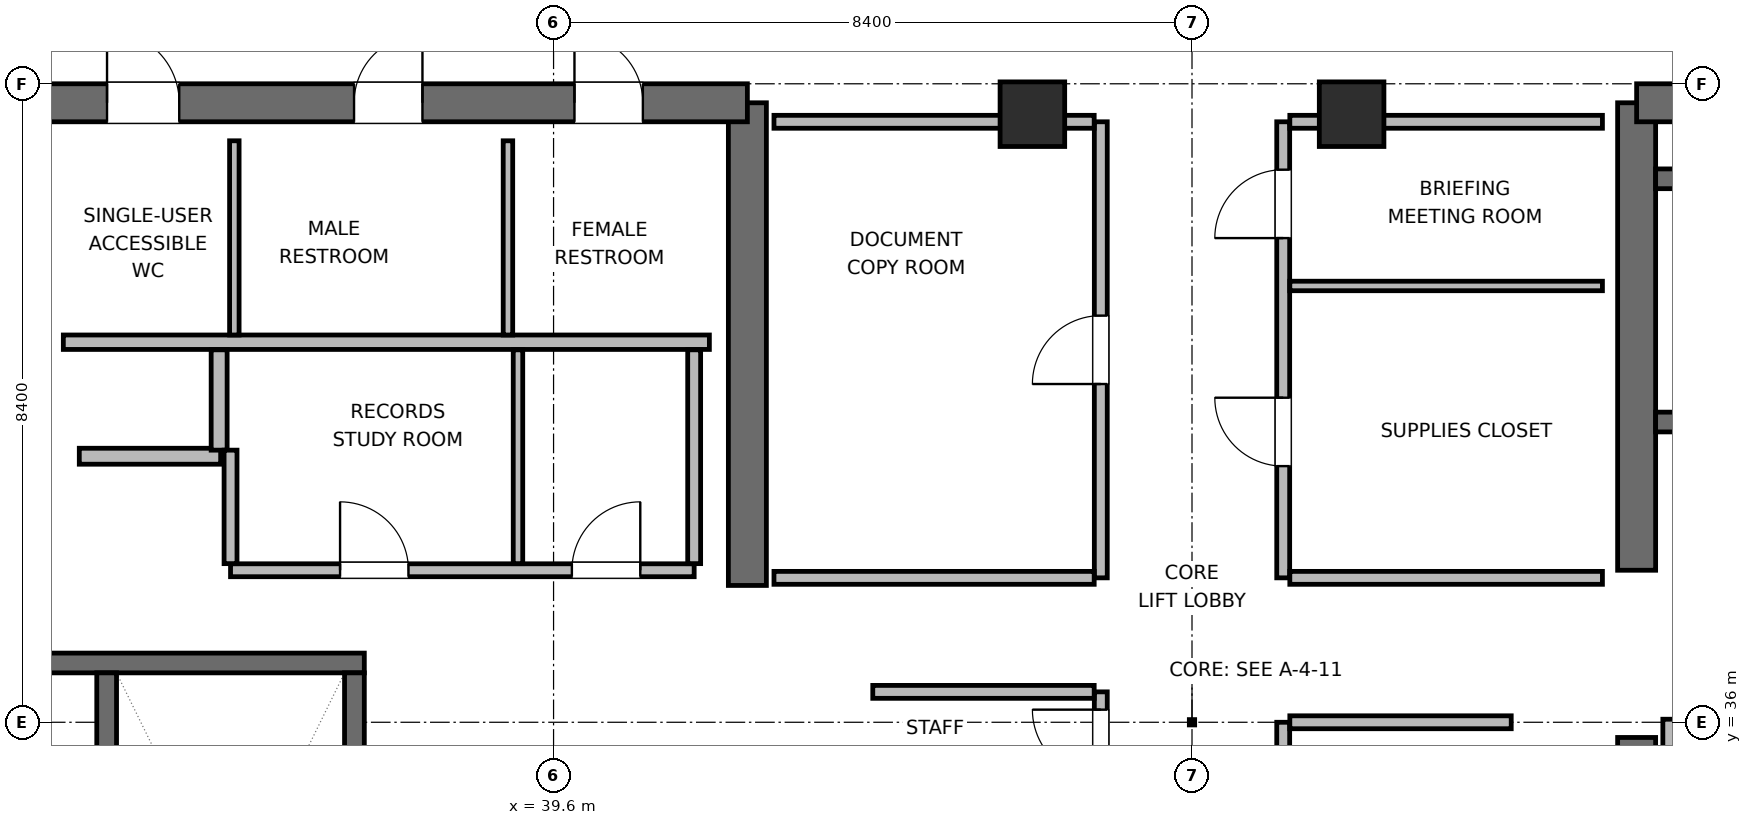
"""IFC4 building model, lengths in metres.
Left out: names, types, materials, properties, quantities, classifications, styles, units other than length and angle.
Written with IfcOpenShell. Run it as: python <this file> out.ifc"""

import sys

from ifc_helpers import new_model, si_unit, direction, frame, frame_2d, origin, origin_2d, place, context, subcontext, project, spatial, rectangle, extrude, element, fill, save


model = new_model("IFC4")
c1 = context("Model", 3, precision=1e-05, world=origin(), true_north=direction((0.0, 1.0)))
c2 = subcontext(c1, "Body", "Model", "MODEL_VIEW")
j1 = project(units=[si_unit("LENGTHUNIT", "METRE"), si_unit("PLANEANGLEUNIT", "RADIAN")], contexts=[c1])
p1 = place(None, origin())
s1 = spatial("IfcSite", under=j1, at=p1, CompositionType="ELEMENT")
p2 = place(p1, origin())
s2 = spatial("IfcBuilding", under=s1, at=p2, CompositionType="ELEMENT")
p3 = place(p2, frame((0.0, 0.0, 286.2)))
s3 = spatial("IfcBuildingStorey", under=s2, at=p3, CompositionType="ELEMENT", Elevation=286.2)
p4 = place(p3, frame((42.15, 37.8, 0.0), z_axis=(0.0, 0.0, 1.0), x_axis=(0.0, 1.0, 0.0)))
e1 = element("IfcWall", 1, at=p4, inside=s3, PredefinedType="SHEAR", context=c2, shape_type="SweptSolid", body=[
    extrude(rectangle(XDim=6.35, YDim=0.5, at=frame_2d((3.175, 0.0))), origin(), (0.0, 0.0, 1.0), 3.9),
])
p5 = place(p3, frame((32.65, 44.15, 0.0), z_axis=(0.0, 0.0, 1.0), x_axis=(1.0, 0.0, 0.0)))
e2 = element("IfcWall", 2, at=p5, inside=s3, PredefinedType="SHEAR", context=c2, shape_type="SweptSolid", body=[
    extrude(rectangle(XDim=9.5, YDim=0.5, at=frame_2d((4.75, 0.0))), origin(), (0.0, 0.0, 1.0), 3.9),
])
p6 = place(p5, frame((1.075, 0.0, 0.0)))
e3 = element("IfcOpeningElement", 3, at=p6, cuts=e2, PredefinedType="OPENING", context=c2, shape_type="SweptSolid", body=[
    extrude(rectangle(XDim=0.95, YDim=2.04, at=frame_2d((0.475, 1.02))), frame((0.0, 0.26, 0.0), z_axis=(0.0, -1.0, 0.0), x_axis=(1.0, 0.0, 0.0)), (0.0, 0.0, 1.0), 0.52),
])
p7 = place(p5, frame((4.325, 0.0, 0.0)))
e4 = element("IfcOpeningElement", 4, at=p7, cuts=e2, PredefinedType="OPENING", context=c2, shape_type="SweptSolid", body=[
    extrude(rectangle(XDim=0.9, YDim=2.02, at=frame_2d((0.45, 1.01))), frame((0.0, 0.26, 0.0), z_axis=(0.0, -1.0, 0.0), x_axis=(1.0, 0.0, 0.0)), (0.0, 0.0, 1.0), 0.52),
])
p8 = place(p5, frame((7.225, 0.0, 0.0)))
e5 = element("IfcOpeningElement", 5, at=p8, cuts=e2, PredefinedType="OPENING", context=c2, shape_type="SweptSolid", body=[
    extrude(rectangle(XDim=0.9, YDim=2.02, at=frame_2d((0.45, 1.01))), frame((0.0, 0.26, 0.0), z_axis=(0.0, -1.0, 0.0), x_axis=(1.0, 0.0, 0.0)), (0.0, 0.0, 1.0), 0.52),
])
p9 = place(p3, frame((53.85, 27.85, 0.0), z_axis=(0.0, 0.0, 1.0), x_axis=(0.0, 1.0, 0.0)))
e6 = element("IfcWall", 6, at=p9, inside=s3, PredefinedType="SHEAR", context=c2, shape_type="SweptSolid", body=[
    extrude(rectangle(XDim=7.95, YDim=0.5, at=frame_2d((3.975, 0.0))), origin(), (0.0, 0.0, 1.0), 3.9),
])
p10 = place(p3, frame((53.85, 38.0, 0.0), z_axis=(0.0, 0.0, 1.0), x_axis=(0.0, 1.0, 0.0)))
e7 = element("IfcWall", 7, at=p10, inside=s3, PredefinedType="SHEAR", context=c2, shape_type="SweptSolid", body=[
    extrude(rectangle(XDim=6.15, YDim=0.5, at=frame_2d((3.075, 0.0))), origin(), (0.0, 0.0, 1.0), 3.9),
])
p11 = place(p3, frame((53.85, 44.15, 0.0), z_axis=(0.0, 0.0, 1.0), x_axis=(1.0, 0.0, 0.0)))
e8 = element("IfcWall", 8, at=p11, inside=s3, PredefinedType="SHEAR", context=c2, shape_type="SweptSolid", body=[
    extrude(rectangle(XDim=9.5, YDim=0.5, at=frame_2d((4.75, 0.0))), origin(), (0.0, 0.0, 1.0), 3.9),
])
p12 = place(p3, frame((32.9, 36.78, 0.0), z_axis=(0.0, 0.0, 1.0), x_axis=(1.0, 0.0, 0.0)))
e9 = element("IfcWall", 9, at=p12, inside=s3, PredefinedType="SHEAR", context=c2, shape_type="SweptSolid", body=[
    extrude(rectangle(XDim=4.21, YDim=0.26, at=frame_2d((2.105, 0.0))), origin(), (0.0, 0.0, 1.0), 3.9),
])
p13 = place(p3, frame((33.72, 29.05, 0.0), z_axis=(0.0, 0.0, 1.0), x_axis=(0.0, 1.0, 0.0)))
e10 = element("IfcWall", 10, at=p13, inside=s3, PredefinedType="SHEAR", context=c2, shape_type="SweptSolid", body=[
    extrude(rectangle(XDim=7.6, YDim=0.26, at=frame_2d((3.8, 0.0))), origin(), (0.0, 0.0, 1.0), 3.9),
])
p14 = place(p3, frame((36.98, 29.05, 0.0), z_axis=(0.0, 0.0, 1.0), x_axis=(0.0, 1.0, 0.0)))
e11 = element("IfcWall", 11, at=p14, inside=s3, PredefinedType="SHEAR", context=c2, shape_type="SweptSolid", body=[
    extrude(rectangle(XDim=7.6, YDim=0.26, at=frame_2d((3.8, 0.0))), origin(), (0.0, 0.0, 1.0), 3.9),
])
p15 = place(p14, frame((0.3, 0.0, 0.0)))
e12 = element("IfcOpeningElement", 12, at=p15, cuts=e11, PredefinedType="OPENING", context=c2, shape_type="SweptSolid", body=[
    extrude(rectangle(XDim=1.0, YDim=2.04, at=frame_2d((0.5, 1.02))), frame((0.0, 0.14, 0.0), z_axis=(0.0, -1.0, 0.0), x_axis=(1.0, 0.0, 0.0)), (0.0, 0.0, 1.0), 0.28),
])
p16 = place(p3, frame((54.1, 39.95, 0.0), z_axis=(0.0, 0.0, 1.0), x_axis=(1.0, 0.0, 0.0)))
e13 = element("IfcWall", 13, at=p16, inside=s3, PredefinedType="SHEAR", context=c2, shape_type="SweptSolid", body=[
    extrude(rectangle(XDim=9.0, YDim=0.26, at=frame_2d((4.5, 0.0))), origin(), (0.0, 0.0, 1.0), 3.9),
])
p17 = place(p16, frame((1.1, 0.0, 0.0)))
e14 = element("IfcOpeningElement", 14, at=p17, cuts=e13, PredefinedType="OPENING", context=c2, shape_type="SweptSolid", body=[
    extrude(rectangle(XDim=1.0, YDim=2.04, at=frame_2d((0.5, 1.02))), frame((0.0, 0.14, 0.0), z_axis=(0.0, -1.0, 0.0), x_axis=(1.0, 0.0, 0.0)), (0.0, 0.0, 1.0), 0.28),
])
p18 = place(p3, frame((54.1, 43.15, 0.0), z_axis=(0.0, 0.0, 1.0), x_axis=(1.0, 0.0, 0.0)))
e15 = element("IfcWall", 15, at=p18, inside=s3, PredefinedType="SHEAR", context=c2, shape_type="SweptSolid", body=[
    extrude(rectangle(XDim=9.0, YDim=0.26, at=frame_2d((4.5, 0.0))), origin(), (0.0, 0.0, 1.0), 3.9),
])
for number, where, z_axis, x_axis in (
    (16, (45.9, 44.0, 0.0), (0.0, 0.0, 1.0), (1.0, 0.0, 0.0)),
    (17, (50.1, 44.0, 0.0), (0.0, 0.0, 1.0), (1.0, 0.0, 0.0)),
):
    element("IfcColumn", number, at=place(p3, frame(where, z_axis=z_axis, x_axis=x_axis)), inside=s3, PredefinedType="COLUMN", context=c2, shape_type="SweptSolid", body=[
        extrude(rectangle(XDim=0.85, YDim=0.85, at=origin_2d()), origin(), (0.0, 0.0, 1.0), 3.9),
    ])
p19 = place(p3, frame((33.15, 41.0, 0.0), z_axis=(0.0, 0.0, 1.0), x_axis=(1.0, 0.0, 0.0)))
e18 = element("IfcWall", 18, at=p19, inside=s3, PredefinedType="PLUMBINGWALL", context=c2, shape_type="SweptSolid", body=[
    extrude(rectangle(XDim=8.5, YDim=0.19, at=frame_2d((4.25, 0.0))), origin(), (0.0, 0.0, 1.0), 3.68),
])
for number, where, z_axis, x_axis in (
    (19, (35.4, 41.095, 0.0), (0.0, 0.0, 1.0), (0.0, 1.0, 0.0)),
    (20, (39.0, 41.095, 0.0), (0.0, 0.0, 1.0), (0.0, 1.0, 0.0)),
):
    element("IfcWall", number, at=place(p3, frame(where, z_axis=z_axis, x_axis=x_axis)), inside=s3, PredefinedType="PARTITIONING", context=c2, shape_type="SweptSolid", body=[
        extrude(rectangle(XDim=2.555, YDim=0.125, at=frame_2d((1.277, 0.0))), origin(), (0.0, 0.0, 1.0), 3.68),
    ])
p20 = place(p3, frame((33.36, 39.5, 0.0), z_axis=(0.0, 0.0, 1.0), x_axis=(1.0, 0.0, 0.0)))
e21 = element("IfcWall", 21, at=p20, inside=s3, PredefinedType="PARTITIONING", context=c2, shape_type="SweptSolid", body=[
    extrude(rectangle(XDim=1.86, YDim=0.21, at=frame_2d((0.93, 0.0))), origin(), (0.0, 0.0, 1.0), 3.68),
])
p21 = place(p3, frame((35.2, 39.58, 0.0), z_axis=(0.0, 0.0, 1.0), x_axis=(0.0, 1.0, 0.0)))
e22 = element("IfcWall", 22, at=p21, inside=s3, PredefinedType="PARTITIONING", context=c2, shape_type="SweptSolid", body=[
    extrude(rectangle(XDim=1.32, YDim=0.21, at=frame_2d((0.66, 0.0))), origin(), (0.0, 0.0, 1.0), 3.68),
])
p22 = place(p3, frame((54.3, 34.26, 0.0), z_axis=(0.0, 0.0, 1.0), x_axis=(0.0, 1.0, 0.0)))
e23 = element("IfcWall", 23, at=p22, inside=s3, PredefinedType="PARTITIONING", context=c2, shape_type="SweptSolid", body=[
    extrude(rectangle(XDim=1.78, YDim=0.21, at=frame_2d((0.89, 0.0))), origin(), (0.0, 0.0, 1.0), 3.68),
])
p23 = place(p3, frame((35.35, 38.0, 0.0), z_axis=(0.0, 0.0, 1.0), x_axis=(1.0, 0.0, 0.0)))
e24 = element("IfcWall", 24, at=p23, inside=s3, PredefinedType="PARTITIONING", context=c2, shape_type="SweptSolid", body=[
    extrude(rectangle(XDim=6.1, YDim=0.17, at=frame_2d((3.05, 0.0))), origin(), (0.0, 0.0, 1.0), 3.68),
])
p24 = place(p23, frame((1.441, 0.0, 0.0)))
e25 = element("IfcOpeningElement", 25, at=p24, cuts=e24, PredefinedType="OPENING", context=c2, shape_type="SweptSolid", body=[
    extrude(rectangle(XDim=0.9, YDim=2.02, at=frame_2d((0.45, 1.01))), frame((0.0, 0.095, 0.0), z_axis=(0.0, -1.0, 0.0), x_axis=(1.0, 0.0, 0.0)), (0.0, 0.0, 1.0), 0.19),
])
p25 = place(p23, frame((4.491, 0.0, 0.0)))
e26 = element("IfcOpeningElement", 26, at=p25, cuts=e24, PredefinedType="OPENING", context=c2, shape_type="SweptSolid", body=[
    extrude(rectangle(XDim=0.9, YDim=2.02, at=frame_2d((0.45, 1.01))), frame((0.0, 0.095, 0.0), z_axis=(0.0, -1.0, 0.0), x_axis=(1.0, 0.0, 0.0)), (0.0, 0.0, 1.0), 0.19),
])
p26 = place(p3, frame((35.35, 38.087, 0.0), z_axis=(0.0, 0.0, 1.0), x_axis=(0.0, 1.0, 0.0)))
e27 = element("IfcWall", 27, at=p26, inside=s3, PredefinedType="PARTITIONING", context=c2, shape_type="SweptSolid", body=[
    extrude(rectangle(XDim=1.493, YDim=0.17, at=frame_2d((0.747, 0.0))), origin(), (0.0, 0.0, 1.0), 3.68),
])
p27 = place(p3, frame((41.45, 38.087, 0.0), z_axis=(0.0, 0.0, 1.0), x_axis=(0.0, 1.0, 0.0)))
e28 = element("IfcWall", 28, at=p27, inside=s3, PredefinedType="PARTITIONING", context=c2, shape_type="SweptSolid", body=[
    extrude(rectangle(XDim=2.813, YDim=0.17, at=frame_2d((1.406, 0.0))), origin(), (0.0, 0.0, 1.0), 3.68),
])
p28 = place(p3, frame((39.132, 38.087, 0.0), z_axis=(0.0, 0.0, 1.0), x_axis=(0.0, 1.0, 0.0)))
e29 = element("IfcWall", 29, at=p28, inside=s3, PredefinedType="PARTITIONING", context=c2, shape_type="SweptSolid", body=[
    extrude(rectangle(XDim=2.813, YDim=0.125, at=frame_2d((1.406, 0.0))), origin(), (0.0, 0.0, 1.0), 3.68),
])
p29 = place(p3, frame((46.8, 32.6, 0.0), z_axis=(0.0, 0.0, 1.0), x_axis=(0.0, 1.0, 0.0)))
e30 = element("IfcWall", 30, at=p29, inside=s3, PredefinedType="PARTITIONING", context=c2, shape_type="SweptSolid", body=[
    extrude(rectangle(XDim=3.8, YDim=0.17, at=frame_2d((1.9, 0.0))), origin(), (0.0, 0.0, 1.0), 3.68),
])
p30 = place(p29, frame((0.766, 0.0, 0.0)))
e31 = element("IfcOpeningElement", 31, at=p30, cuts=e30, PredefinedType="OPENING", context=c2, shape_type="SweptSolid", body=[
    extrude(rectangle(XDim=0.9, YDim=2.02, at=frame_2d((0.45, 1.01))), frame((0.0, 0.095, 0.0), z_axis=(0.0, -1.0, 0.0), x_axis=(1.0, 0.0, 0.0)), (0.0, 0.0, 1.0), 0.19),
])
p31 = place(p29, frame((2.666, 0.0, 0.0)))
e32 = element("IfcOpeningElement", 32, at=p31, cuts=e30, PredefinedType="OPENING", context=c2, shape_type="SweptSolid", body=[
    extrude(rectangle(XDim=0.9, YDim=2.02, at=frame_2d((0.45, 1.01))), frame((0.0, 0.095, 0.0), z_axis=(0.0, -1.0, 0.0), x_axis=(1.0, 0.0, 0.0)), (0.0, 0.0, 1.0), 0.19),
])
p32 = place(p3, frame((43.8, 36.4, 0.0), z_axis=(0.0, 0.0, 1.0), x_axis=(1.0, 0.0, 0.0)))
e33 = element("IfcWall", 33, at=p32, inside=s3, PredefinedType="PARTITIONING", context=c2, shape_type="SweptSolid", body=[
    extrude(rectangle(XDim=2.913, YDim=0.17, at=frame_2d((1.457, 0.0))), origin(), (0.0, 0.0, 1.0), 3.68),
])
p33 = place(p3, frame((49.2, 32.6, 0.0), z_axis=(0.0, 0.0, 1.0), x_axis=(0.0, 1.0, 0.0)))
e34 = element("IfcWall", 34, at=p33, inside=s3, PredefinedType="PARTITIONING", context=c2, shape_type="SweptSolid", body=[
    extrude(rectangle(XDim=3.4, YDim=0.17, at=frame_2d((1.7, 0.0))), origin(), (0.0, 0.0, 1.0), 3.68),
])
p34 = place(p33, frame((0.4, 0.0, 0.0)))
e35 = element("IfcOpeningElement", 35, at=p34, cuts=e34, PredefinedType="OPENING", context=c2, shape_type="SweptSolid", body=[
    extrude(rectangle(XDim=0.9, YDim=2.02, at=frame_2d((0.45, 1.01))), frame((0.0, 0.095, 0.0), z_axis=(0.0, -1.0, 0.0), x_axis=(1.0, 0.0, 0.0)), (0.0, 0.0, 1.0), 0.19),
])
p35 = place(p33, frame((2.1, 0.0, 0.0)))
e36 = element("IfcOpeningElement", 36, at=p35, cuts=e34, PredefinedType="OPENING", context=c2, shape_type="SweptSolid", body=[
    extrude(rectangle(XDim=0.9, YDim=2.02, at=frame_2d((0.45, 1.01))), frame((0.0, 0.095, 0.0), z_axis=(0.0, -1.0, 0.0), x_axis=(1.0, 0.0, 0.0)), (0.0, 0.0, 1.0), 0.19),
])
p36 = place(p3, frame((49.287, 36.0, 0.0), z_axis=(0.0, 0.0, 1.0), x_axis=(1.0, 0.0, 0.0)))
e37 = element("IfcWall", 37, at=p36, inside=s3, PredefinedType="PARTITIONING", context=c2, shape_type="SweptSolid", body=[
    extrude(rectangle(XDim=2.913, YDim=0.17, at=frame_2d((1.457, 0.0))), origin(), (0.0, 0.0, 1.0), 3.68),
])
p37 = place(p3, frame((46.8, 37.9, 0.0), z_axis=(0.0, 0.0, 1.0), x_axis=(0.0, 1.0, 0.0)))
e38 = element("IfcWall", 38, at=p37, inside=s3, PredefinedType="PARTITIONING", context=c2, shape_type="SweptSolid", body=[
    extrude(rectangle(XDim=6.0, YDim=0.17, at=frame_2d((3.0, 0.0))), origin(), (0.0, 0.0, 1.0), 3.68),
])
p38 = place(p37, frame((2.55, 0.0, 0.0)))
e39 = element("IfcOpeningElement", 39, at=p38, cuts=e38, PredefinedType="OPENING", context=c2, shape_type="SweptSolid", body=[
    extrude(rectangle(XDim=0.9, YDim=2.02, at=frame_2d((0.45, 1.01))), frame((0.0, 0.095, 0.0), z_axis=(0.0, -1.0, 0.0), x_axis=(1.0, 0.0, 0.0)), (0.0, 0.0, 1.0), 0.19),
])
p39 = place(p3, frame((42.5, 37.9, 0.0), z_axis=(0.0, 0.0, 1.0), x_axis=(1.0, 0.0, 0.0)))
e40 = element("IfcWall", 40, at=p39, inside=s3, PredefinedType="PARTITIONING", context=c2, shape_type="SweptSolid", body=[
    extrude(rectangle(XDim=4.213, YDim=0.17, at=frame_2d((2.106, 0.0))), origin(), (0.0, 0.0, 1.0), 3.68),
])
p40 = place(p3, frame((42.5, 43.9, 0.0), z_axis=(0.0, 0.0, 1.0), x_axis=(1.0, 0.0, 0.0)))
e41 = element("IfcWall", 41, at=p40, inside=s3, PredefinedType="PARTITIONING", context=c2, shape_type="SweptSolid", body=[
    extrude(rectangle(XDim=4.213, YDim=0.17, at=frame_2d((2.106, 0.0))), origin(), (0.0, 0.0, 1.0), 2.765),
])
p41 = place(p3, frame((49.2, 37.9, 0.0), z_axis=(0.0, 0.0, 1.0), x_axis=(0.0, 1.0, 0.0)))
e42 = element("IfcWall", 42, at=p41, inside=s3, PredefinedType="PARTITIONING", context=c2, shape_type="SweptSolid", body=[
    extrude(rectangle(XDim=6.0, YDim=0.17, at=frame_2d((3.0, 0.0))), origin(), (0.0, 0.0, 1.0), 3.68),
])
p42 = place(p41, frame((1.47, 0.0, 0.0)))
e43 = element("IfcOpeningElement", 43, at=p42, cuts=e42, PredefinedType="OPENING", context=c2, shape_type="SweptSolid", body=[
    extrude(rectangle(XDim=0.9, YDim=2.02, at=frame_2d((0.45, 1.01))), frame((0.0, 0.095, 0.0), z_axis=(0.0, -1.0, 0.0), x_axis=(1.0, 0.0, 0.0)), (0.0, 0.0, 1.0), 0.19),
])
p43 = place(p41, frame((4.47, 0.0, 0.0)))
e44 = element("IfcOpeningElement", 44, at=p43, cuts=e42, PredefinedType="OPENING", context=c2, shape_type="SweptSolid", body=[
    extrude(rectangle(XDim=0.9, YDim=2.02, at=frame_2d((0.45, 1.01))), frame((0.0, 0.095, 0.0), z_axis=(0.0, -1.0, 0.0), x_axis=(1.0, 0.0, 0.0)), (0.0, 0.0, 1.0), 0.19),
])
p44 = place(p3, frame((49.287, 37.9, 0.0), z_axis=(0.0, 0.0, 1.0), x_axis=(1.0, 0.0, 0.0)))
e45 = element("IfcWall", 45, at=p44, inside=s3, PredefinedType="PARTITIONING", context=c2, shape_type="SweptSolid", body=[
    extrude(rectangle(XDim=4.113, YDim=0.17, at=frame_2d((2.056, 0.0))), origin(), (0.0, 0.0, 1.0), 3.68),
])
p45 = place(p3, frame((49.287, 43.9, 0.0), z_axis=(0.0, 0.0, 1.0), x_axis=(1.0, 0.0, 0.0)))
e46 = element("IfcWall", 46, at=p45, inside=s3, PredefinedType="PARTITIONING", context=c2, shape_type="SweptSolid", body=[
    extrude(rectangle(XDim=4.113, YDim=0.17, at=frame_2d((2.056, 0.0))), origin(), (0.0, 0.0, 1.0), 2.765),
])
p46 = place(p3, frame((49.287, 41.74, 0.0), z_axis=(0.0, 0.0, 1.0), x_axis=(1.0, 0.0, 0.0)))
e47 = element("IfcWall", 47, at=p46, inside=s3, PredefinedType="PARTITIONING", context=c2, shape_type="SweptSolid", body=[
    extrude(rectangle(XDim=4.113, YDim=0.125, at=frame_2d((2.056, 0.0))), origin(), (0.0, 0.0, 1.0), 3.68),
])
p47 = place(p6, origin())
e48 = element("IfcDoor", 48, at=p47, inside=s3, OperationType="SINGLE_SWING_LEFT", PredefinedType="DOOR", context=c2, shape_type="SweptSolid", body=[
    extrude(rectangle(XDim=0.95, YDim=2.04, at=frame_2d((0.475, 1.02))), frame((0.0, 0.025, 0.0), z_axis=(0.0, -1.0, 0.0), x_axis=(1.0, 0.0, 0.0)), (0.0, 0.0, 1.0), 0.05),
])
fill(e3, e48)
p48 = place(p7, origin())
e49 = element("IfcDoor", 49, at=p48, inside=s3, OperationType="SINGLE_SWING_RIGHT", PredefinedType="DOOR", context=c2, shape_type="SweptSolid", body=[
    extrude(rectangle(XDim=0.9, YDim=2.02, at=frame_2d((0.45, 1.01))), frame((0.0, 0.025, 0.0), z_axis=(0.0, -1.0, 0.0), x_axis=(1.0, 0.0, 0.0)), (0.0, 0.0, 1.0), 0.05),
])
fill(e4, e49)
p49 = place(p8, origin())
e50 = element("IfcDoor", 50, at=p49, inside=s3, OperationType="SINGLE_SWING_LEFT", PredefinedType="DOOR", context=c2, shape_type="SweptSolid", body=[
    extrude(rectangle(XDim=0.9, YDim=2.02, at=frame_2d((0.45, 1.01))), frame((0.0, 0.025, 0.0), z_axis=(0.0, -1.0, 0.0), x_axis=(1.0, 0.0, 0.0)), (0.0, 0.0, 1.0), 0.05),
])
fill(e5, e50)
p50 = place(p24, origin())
e51 = element("IfcDoor", 51, at=p50, inside=s3, OperationType="SINGLE_SWING_LEFT", PredefinedType="DOOR", context=c2, shape_type="SweptSolid", body=[
    extrude(rectangle(XDim=0.9, YDim=2.02, at=frame_2d((0.45, 1.01))), frame((0.0, 0.025, 0.0), z_axis=(0.0, -1.0, 0.0), x_axis=(1.0, 0.0, 0.0)), (0.0, 0.0, 1.0), 0.05),
])
fill(e25, e51)
p51 = place(p25, origin())
e52 = element("IfcDoor", 52, at=p51, inside=s3, OperationType="SINGLE_SWING_RIGHT", PredefinedType="DOOR", context=c2, shape_type="SweptSolid", body=[
    extrude(rectangle(XDim=0.9, YDim=2.02, at=frame_2d((0.45, 1.01))), frame((0.0, 0.025, 0.0), z_axis=(0.0, -1.0, 0.0), x_axis=(1.0, 0.0, 0.0)), (0.0, 0.0, 1.0), 0.05),
])
fill(e26, e52)
p52 = place(p31, origin())
e53 = element("IfcDoor", 53, at=p52, inside=s3, OperationType="SINGLE_SWING_RIGHT", PredefinedType="DOOR", context=c2, shape_type="SweptSolid", body=[
    extrude(rectangle(XDim=0.9, YDim=2.02, at=frame_2d((0.45, 1.01))), frame((0.0, 0.025, 0.0), z_axis=(0.0, -1.0, 0.0), x_axis=(1.0, 0.0, 0.0)), (0.0, 0.0, 1.0), 0.05),
])
fill(e32, e53)
p53 = place(p38, origin())
e54 = element("IfcDoor", 54, at=p53, inside=s3, OperationType="SINGLE_SWING_LEFT", PredefinedType="DOOR", context=c2, shape_type="SweptSolid", body=[
    extrude(rectangle(XDim=0.9, YDim=2.02, at=frame_2d((0.45, 1.01))), frame((0.0, 0.025, 0.0), z_axis=(0.0, -1.0, 0.0), x_axis=(1.0, 0.0, 0.0)), (0.0, 0.0, 1.0), 0.05),
])
fill(e39, e54)
p54 = place(p42, origin())
e55 = element("IfcDoor", 55, at=p54, inside=s3, OperationType="SINGLE_SWING_RIGHT", PredefinedType="DOOR", context=c2, shape_type="SweptSolid", body=[
    extrude(rectangle(XDim=0.9, YDim=2.02, at=frame_2d((0.45, 1.01))), frame((0.0, 0.025, 0.0), z_axis=(0.0, -1.0, 0.0), x_axis=(1.0, 0.0, 0.0)), (0.0, 0.0, 1.0), 0.05),
])
fill(e43, e55)
p55 = place(p43, origin())
e56 = element("IfcDoor", 56, at=p55, inside=s3, OperationType="SINGLE_SWING_LEFT", PredefinedType="DOOR", context=c2, shape_type="SweptSolid", body=[
    extrude(rectangle(XDim=0.9, YDim=2.02, at=frame_2d((0.45, 1.01))), frame((0.0, 0.025, 0.0), z_axis=(0.0, -1.0, 0.0), x_axis=(1.0, 0.0, 0.0)), (0.0, 0.0, 1.0), 0.05),
])
fill(e44, e56)
save(model, sys.argv[1])
